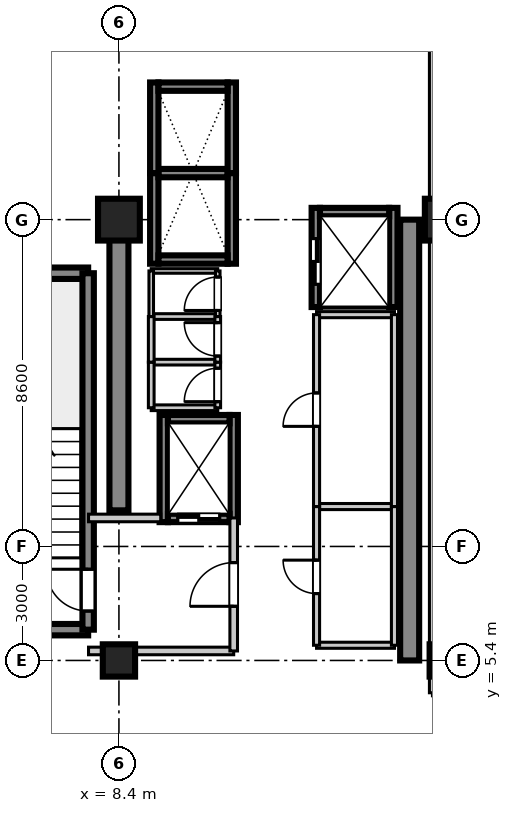
"""IFC4 building model, lengths in metres.
Left out: names, types, materials, properties, quantities, classifications, styles, units other than length and angle.
Written with IfcOpenShell. Run it as: python <this file> out.ifc"""

import sys

from ifc_helpers import new_model, si_unit, direction, frame, frame_2d, origin, origin_2d, place, context, subcontext, project, spatial, rectangle, extrude, source, transform, mapped, element, fill, save


model = new_model("IFC4")
c1 = context("Model", 3, precision=1e-05, world=origin(), true_north=direction((0.0, 1.0)))
c2 = subcontext(c1, "Body", "Model", "MODEL_VIEW")
j1 = project(units=[si_unit("LENGTHUNIT", "METRE"), si_unit("PLANEANGLEUNIT", "RADIAN")], contexts=[c1])
p1 = place(None, origin())
s1 = spatial("IfcSite", under=j1, at=p1, CompositionType="ELEMENT")
p2 = place(p1, origin())
s2 = spatial("IfcBuilding", under=s1, at=p2, CompositionType="ELEMENT")
p3 = place(p2, frame((0.0, 0.0, 156.3)))
s3 = spatial("IfcBuildingStorey", under=s2, at=p3, CompositionType="ELEMENT", Elevation=156.3)
m1 = source(origin(), c2, "Body", "SweptSolid", [
    extrude(rectangle(XDim=0.85, YDim=0.85, at=origin_2d()), origin(), (0.0, 0.0, 1.0), 3.605),
])
p4 = place(p3, frame((8.4, 5.4, 0.0), z_axis=(0.0, 0.0, 1.0), x_axis=(1.0, 0.0, 0.0)))
e1 = element("IfcColumn", 1, at=p4, inside=s3, PredefinedType="PILASTER", context=c2, shape_type="MappedRepresentation", body=[
    mapped(m1, transform((0.0, 0.0, 0.0), scale=1.0)),
])
m2 = source(origin(), c2, "Body", "SweptSolid", [
    extrude(rectangle(XDim=1.1, YDim=1.1, at=origin_2d()), origin(), (0.0, 0.0, 1.0), 3.605),
])
p5 = place(p3, frame((8.4, 17.0, 0.0), z_axis=(0.0, 0.0, 1.0), x_axis=(1.0, 0.0, 0.0)))
e2 = element("IfcColumn", 2, at=p5, inside=s3, PredefinedType="COLUMN", context=c2, shape_type="MappedRepresentation", body=[
    mapped(m2, transform((0.0, 0.0, 0.0), scale=1.0)),
])
p6 = place(p3, frame((17.0, 5.4, 0.0), z_axis=(0.0, 0.0, 1.0), x_axis=(1.0, 0.0, 0.0)))
e3 = element("IfcColumn", 3, at=p6, inside=s3, PredefinedType="PILASTER", context=c2, shape_type="MappedRepresentation", body=[
    mapped(m1, transform((0.0, 0.0, 0.0), scale=1.0)),
])
p7 = place(p3, frame((17.0, 17.0, 0.0), z_axis=(0.0, 0.0, 1.0), x_axis=(1.0, 0.0, 0.0)))
e4 = element("IfcColumn", 4, at=p7, inside=s3, PredefinedType="COLUMN", context=c2, shape_type="MappedRepresentation", body=[
    mapped(m2, transform((0.0, 0.0, 0.0), scale=1.0)),
])
m3 = source(origin(), c2, "Body", "SweptSolid", [
    extrude(rectangle(XDim=7.65, YDim=0.5, at=frame_2d((3.825, 0.0))), origin(), (0.0, 0.0, 1.0), 3.39),
])
p8 = place(p3, frame((8.4, 9.35, 0.0), z_axis=(0.0, 0.0, 1.0), x_axis=(0.0, 1.0, 0.0)))
e5 = element("IfcWall", 5, at=p8, inside=s3, PredefinedType="SHEAR", context=c2, shape_type="MappedRepresentation", body=[
    mapped(m3, transform((0.0, 0.0, 0.0), scale=1.0)),
])
m4 = source(origin(), c2, "Body", "SweptSolid", [
    extrude(rectangle(XDim=11.6, YDim=0.5, at=frame_2d((5.8, 0.0))), origin(), (0.0, 0.0, 1.0), 3.39),
])
p9 = place(p3, frame((16.05, 5.4, 0.0), z_axis=(0.0, 0.0, 1.0), x_axis=(0.0, 1.0, 0.0)))
e6 = element("IfcWall", 6, at=p9, inside=s3, PredefinedType="SHEAR", context=c2, shape_type="MappedRepresentation", body=[
    mapped(m4, transform((0.0, 0.0, 0.0), scale=1.0)),
])
m5 = source(origin(), c2, "Body", "SweptSolid", [
    extrude(rectangle(XDim=3.98, YDim=0.3, at=frame_2d((1.99, 0.0))), origin(), (0.0, 0.0, 1.0), 3.39),
])
for number, where, z_axis, x_axis in (
    (7, (3.61, 6.21, 0.0), (0.0, 0.0, 1.0), (1.0, 0.0, 0.0)),
    (8, (3.61, 15.59, 0.0), (0.0, 0.0, 1.0), (1.0, 0.0, 0.0)),
):
    element("IfcWall", number, at=place(p3, frame(where, z_axis=z_axis, x_axis=x_axis)), inside=s3, PredefinedType="SHEAR", context=c2, shape_type="MappedRepresentation", body=[
        mapped(m5, transform((0.0, 0.0, 0.0), scale=1.0)),
    ])
m6 = source(origin(), c2, "Body", "SweptSolid", [
    extrude(rectangle(XDim=9.38, YDim=0.3, at=frame_2d((4.69, 0.0))), origin(), (0.0, 0.0, 1.0), 3.39),
])
p10 = place(p3, frame((7.59, 6.21, 0.0), z_axis=(0.0, 0.0, 1.0), x_axis=(0.0, 1.0, 0.0)))
e9 = element("IfcWall", 9, at=p10, inside=s3, PredefinedType="SHEAR", context=c2, shape_type="MappedRepresentation", body=[
    mapped(m6, transform((0.0, 0.0, 0.0), scale=1.0)),
])
p11 = place(p10, frame((0.49, 0.0, 0.0)))
e10 = element("IfcOpeningElement", 10, at=p11, cuts=e9, PredefinedType="OPENING", context=c2, shape_type="SweptSolid", body=[
    extrude(rectangle(XDim=1.1, YDim=2.15, at=frame_2d((0.55, 1.075))), frame((0.0, 0.16, 0.0), z_axis=(0.0, -1.0, 0.0), x_axis=(1.0, 0.0, 0.0)), (0.0, 0.0, 1.0), 0.32),
])
m7 = source(origin(), c2, "Body", "SweptSolid", [
    extrude(rectangle(XDim=2.385, YDim=0.22, at=frame_2d((1.192, 0.0))), origin(), (0.0, 0.0, 1.0), 3.39),
])
for number, where, z_axis, x_axis in (
    (11, (9.33, 15.84, 0.0), (0.0, 0.0, 1.0), (0.0, 1.0, 0.0)),
    (12, (11.37, 15.84, 0.0), (0.0, 0.0, 1.0), (0.0, 1.0, 0.0)),
):
    element("IfcWall", number, at=place(p3, frame(where, z_axis=z_axis, x_axis=x_axis)), inside=s3, PredefinedType="SHEAR", context=c2, shape_type="MappedRepresentation", body=[
        mapped(m7, transform((0.0, 0.0, 0.0), scale=1.0)),
    ])
m8 = source(origin(), c2, "Body", "SweptSolid", [
    extrude(rectangle(XDim=1.82, YDim=0.22, at=frame_2d((0.91, 0.0))), origin(), (0.0, 0.0, 1.0), 3.39),
])
p12 = place(p3, frame((9.44, 15.95, 0.0), z_axis=(0.0, 0.0, 1.0), x_axis=(1.0, 0.0, 0.0)))
e13 = element("IfcWall", 13, at=p12, inside=s3, PredefinedType="SHEAR", context=c2, shape_type="MappedRepresentation", body=[
    mapped(m8, transform((0.0, 0.0, 0.0), scale=1.0)),
])
m9 = source(origin(), c2, "Body", "SweptSolid", [
    extrude(rectangle(XDim=1.82, YDim=0.22, at=frame_2d((0.91, 0.0))), origin(), (0.0, 0.0, 1.0), 3.65),
])
p13 = place(p3, frame((9.44, 18.225, 0.0), z_axis=(0.0, 0.0, 1.0), x_axis=(1.0, 0.0, 0.0)))
e14 = element("IfcWall", 14, at=p13, inside=s3, PredefinedType="SHEAR", context=c2, shape_type="MappedRepresentation", body=[
    mapped(m9, transform((0.0, 0.0, 0.0), scale=1.0)),
])
for number, where, z_axis, x_axis in (
    (15, (9.33, 18.225, 0.0), (0.0, 0.0, 1.0), (0.0, 1.0, 0.0)),
    (16, (11.37, 18.225, 0.0), (0.0, 0.0, 1.0), (0.0, 1.0, 0.0)),
):
    element("IfcWall", number, at=place(p3, frame(where, z_axis=z_axis, x_axis=x_axis)), inside=s3, PredefinedType="SHEAR", context=c2, shape_type="MappedRepresentation", body=[
        mapped(m7, transform((0.0, 0.0, 0.0), scale=1.0)),
    ])
p14 = place(p3, frame((9.44, 20.5, 0.0), z_axis=(0.0, 0.0, 1.0), x_axis=(1.0, 0.0, 0.0)))
e17 = element("IfcWall", 17, at=p14, inside=s3, PredefinedType="SHEAR", context=c2, shape_type="MappedRepresentation", body=[
    mapped(m8, transform((0.0, 0.0, 0.0), scale=1.0)),
])
m10 = source(origin(), c2, "Body", "SweptSolid", [
    extrude(rectangle(XDim=2.82, YDim=0.22, at=frame_2d((1.41, 0.0))), origin(), (0.0, 0.0, 1.0), 3.39),
])
for number, where, z_axis, x_axis in (
    (18, (9.58, 9.04, 0.0), (0.0, 0.0, 1.0), (0.0, 1.0, 0.0)),
    (19, (11.42, 9.04, 0.0), (0.0, 0.0, 1.0), (0.0, 1.0, 0.0)),
):
    element("IfcWall", number, at=place(p3, frame(where, z_axis=z_axis, x_axis=x_axis)), inside=s3, PredefinedType="SHEAR", context=c2, shape_type="MappedRepresentation", body=[
        mapped(m10, transform((0.0, 0.0, 0.0), scale=1.0)),
    ])
m11 = source(origin(), c2, "Body", "SweptSolid", [
    extrude(rectangle(XDim=1.62, YDim=0.22, at=frame_2d((0.81, 0.0))), origin(), (0.0, 0.0, 1.0), 3.39),
])
p15 = place(p3, frame((9.69, 9.15, 0.0), z_axis=(0.0, 0.0, 1.0), x_axis=(1.0, 0.0, 0.0)))
e20 = element("IfcWall", 20, at=p15, inside=s3, PredefinedType="SHEAR", context=c2, shape_type="MappedRepresentation", body=[
    mapped(m11, transform((0.0, 0.0, 0.0), scale=1.0)),
])
p16 = place(p15, frame((0.26, 0.0, 0.0)))
e21 = element("IfcOpeningElement", 21, at=p16, cuts=e20, PredefinedType="OPENING", context=c2, shape_type="SweptSolid", body=[
    extrude(rectangle(XDim=1.1, YDim=2.2, at=frame_2d((0.55, 1.1))), frame((0.0, 0.12, 0.0), z_axis=(0.0, -1.0, 0.0), x_axis=(1.0, 0.0, 0.0)), (0.0, 0.0, 1.0), 0.24),
])
p17 = place(p3, frame((9.69, 11.75, 0.0), z_axis=(0.0, 0.0, 1.0), x_axis=(1.0, 0.0, 0.0)))
e22 = element("IfcWall", 22, at=p17, inside=s3, PredefinedType="SHEAR", context=c2, shape_type="MappedRepresentation", body=[
    mapped(m11, transform((0.0, 0.0, 0.0), scale=1.0)),
])
m12 = source(origin(), c2, "Body", "SweptSolid", [
    extrude(rectangle(XDim=2.61, YDim=0.22, at=frame_2d((1.305, 0.0))), origin(), (0.0, 0.0, 1.0), 3.39),
])
p18 = place(p3, frame((13.58, 14.7, 0.0), z_axis=(0.0, 0.0, 1.0), x_axis=(0.0, 1.0, 0.0)))
e23 = element("IfcWall", 23, at=p18, inside=s3, PredefinedType="SHEAR", context=c2, shape_type="MappedRepresentation", body=[
    mapped(m12, transform((0.0, 0.0, 0.0), scale=1.0)),
])
p19 = place(p18, frame((0.6, 0.0, 0.0)))
e24 = element("IfcOpeningElement", 24, at=p19, cuts=e23, PredefinedType="OPENING", context=c2, shape_type="SweptSolid", body=[
    extrude(rectangle(XDim=1.2, YDim=2.2, at=frame_2d((0.6, 1.1))), frame((0.0, 0.12, 0.0), z_axis=(0.0, -1.0, 0.0), x_axis=(1.0, 0.0, 0.0)), (0.0, 0.0, 1.0), 0.24),
])
p20 = place(p3, frame((15.62, 14.7, 0.0), z_axis=(0.0, 0.0, 1.0), x_axis=(0.0, 1.0, 0.0)))
e25 = element("IfcWall", 25, at=p20, inside=s3, PredefinedType="SHEAR", context=c2, shape_type="MappedRepresentation", body=[
    mapped(m12, transform((0.0, 0.0, 0.0), scale=1.0)),
])
p21 = place(p3, frame((13.69, 17.2, 0.0), z_axis=(0.0, 0.0, 1.0), x_axis=(1.0, 0.0, 0.0)))
e26 = element("IfcWall", 26, at=p21, inside=s3, PredefinedType="SHEAR", context=c2, shape_type="MappedRepresentation", body=[
    mapped(m8, transform((0.0, 0.0, 0.0), scale=1.0)),
])
m13 = source(origin(), c2, "Body", "SweptSolid", [
    extrude(rectangle(XDim=3.82, YDim=0.2, at=frame_2d((1.91, 0.0))), origin(), (0.0, 0.0, 1.0), 2.73),
])
p22 = place(p3, frame((7.6, 5.65, 0.0), z_axis=(0.0, 0.0, 1.0), x_axis=(1.0, 0.0, 0.0)))
e27 = element("IfcWall", 27, at=p22, inside=s3, PredefinedType="PARTITIONING", context=c2, shape_type="MappedRepresentation", body=[
    mapped(m13, transform((0.0, 0.0, 0.0), scale=1.0)),
])
m14 = source(origin(), c2, "Body", "SweptSolid", [
    extrude(rectangle(XDim=1.9, YDim=0.2, at=frame_2d((0.95, 0.0))), origin(), (0.0, 0.0, 1.0), 2.73),
])
p23 = place(p3, frame((7.6, 9.15, 0.0), z_axis=(0.0, 0.0, 1.0), x_axis=(1.0, 0.0, 0.0)))
e28 = element("IfcWall", 28, at=p23, inside=s3, PredefinedType="PARTITIONING", context=c2, shape_type="MappedRepresentation", body=[
    mapped(m14, transform((0.0, 0.0, 0.0), scale=1.0)),
])
m15 = source(origin(), c2, "Body", "SweptSolid", [
    extrude(rectangle(XDim=3.5, YDim=0.2, at=frame_2d((1.75, 0.0))), origin(), (0.0, 0.0, 1.0), 2.73),
])
p24 = place(p3, frame((11.42, 5.65, 0.0), z_axis=(0.0, 0.0, 1.0), x_axis=(0.0, 1.0, 0.0)))
e29 = element("IfcWall", 29, at=p24, inside=s3, PredefinedType="PARTITIONING", context=c2, shape_type="MappedRepresentation", body=[
    mapped(m15, transform((0.0, 0.0, 0.0), scale=1.0)),
])
p25 = place(p24, frame((1.175, 0.0, 0.0)))
e30 = element("IfcOpeningElement", 30, at=p25, cuts=e29, PredefinedType="OPENING", context=c2, shape_type="SweptSolid", body=[
    extrude(rectangle(XDim=1.15, YDim=2.15, at=frame_2d((0.575, 1.075))), frame((0.0, 0.11, 0.0), z_axis=(0.0, -1.0, 0.0), x_axis=(1.0, 0.0, 0.0)), (0.0, 0.0, 1.0), 0.22),
])
m16 = source(origin(), c2, "Body", "SweptSolid", [
    extrude(rectangle(XDim=1.75, YDim=0.15, at=frame_2d((0.875, 0.0))), origin(), (0.0, 0.0, 1.0), 2.73),
])
for number, where, z_axis, x_axis in (
    (31, (9.25, 12.05, 0.0), (0.0, 0.0, 1.0), (1.0, 0.0, 0.0)),
    (32, (9.25, 13.25, 0.0), (0.0, 0.0, 1.0), (1.0, 0.0, 0.0)),
):
    element("IfcWall", number, at=place(p3, frame(where, z_axis=z_axis, x_axis=x_axis)), inside=s3, PredefinedType="PARTITIONING", context=c2, shape_type="MappedRepresentation", body=[
        mapped(m16, transform((0.0, 0.0, 0.0), scale=1.0)),
    ])
m17 = source(origin(), c2, "Body", "SweptSolid", [
    extrude(rectangle(XDim=1.2, YDim=0.15, at=frame_2d((0.6, 0.0))), origin(), (0.0, 0.0, 1.0), 2.73),
])
p26 = place(p3, frame((9.25, 12.05, 0.0), z_axis=(0.0, 0.0, 1.0), x_axis=(0.0, 1.0, 0.0)))
e33 = element("IfcWall", 33, at=p26, inside=s3, PredefinedType="PARTITIONING", context=c2, shape_type="MappedRepresentation", body=[
    mapped(m17, transform((0.0, 0.0, 0.0), scale=1.0)),
])
p27 = place(p3, frame((11.0, 12.05, 0.0), z_axis=(0.0, 0.0, 1.0), x_axis=(0.0, 1.0, 0.0)))
e34 = element("IfcWall", 34, at=p27, inside=s3, PredefinedType="PARTITIONING", context=c2, shape_type="MappedRepresentation", body=[
    mapped(m17, transform((0.0, 0.0, 0.0), scale=1.0)),
])
p28 = place(p27, frame((0.16, 0.0, 0.0)))
e35 = element("IfcOpeningElement", 35, at=p28, cuts=e34, PredefinedType="OPENING", context=c2, shape_type="SweptSolid", body=[
    extrude(rectangle(XDim=0.88, YDim=2.1, at=frame_2d((0.44, 1.05))), frame((0.0, 0.085, 0.0), z_axis=(0.0, -1.0, 0.0), x_axis=(1.0, 0.0, 0.0)), (0.0, 0.0, 1.0), 0.17),
])
p29 = place(p3, frame((9.25, 14.45, 0.0), z_axis=(0.0, 0.0, 1.0), x_axis=(1.0, 0.0, 0.0)))
e36 = element("IfcWall", 36, at=p29, inside=s3, PredefinedType="PARTITIONING", context=c2, shape_type="MappedRepresentation", body=[
    mapped(m16, transform((0.0, 0.0, 0.0), scale=1.0)),
])
p30 = place(p3, frame((9.25, 13.25, 0.0), z_axis=(0.0, 0.0, 1.0), x_axis=(0.0, 1.0, 0.0)))
e37 = element("IfcWall", 37, at=p30, inside=s3, PredefinedType="PARTITIONING", context=c2, shape_type="MappedRepresentation", body=[
    mapped(m17, transform((0.0, 0.0, 0.0), scale=1.0)),
])
p31 = place(p3, frame((11.0, 13.25, 0.0), z_axis=(0.0, 0.0, 1.0), x_axis=(0.0, 1.0, 0.0)))
e38 = element("IfcWall", 38, at=p31, inside=s3, PredefinedType="PARTITIONING", context=c2, shape_type="MappedRepresentation", body=[
    mapped(m17, transform((0.0, 0.0, 0.0), scale=1.0)),
])
p32 = place(p31, frame((0.16, 0.0, 0.0)))
e39 = element("IfcOpeningElement", 39, at=p32, cuts=e38, PredefinedType="OPENING", context=c2, shape_type="SweptSolid", body=[
    extrude(rectangle(XDim=0.88, YDim=2.1, at=frame_2d((0.44, 1.05))), frame((0.0, 0.085, 0.0), z_axis=(0.0, -1.0, 0.0), x_axis=(1.0, 0.0, 0.0)), (0.0, 0.0, 1.0), 0.17),
])
m18 = source(origin(), c2, "Body", "SweptSolid", [
    extrude(rectangle(XDim=1.75, YDim=0.12, at=frame_2d((0.875, 0.0))), origin(), (0.0, 0.0, 1.0), 2.73),
])
p33 = place(p3, frame((9.25, 15.65, 0.0), z_axis=(0.0, 0.0, 1.0), x_axis=(1.0, 0.0, 0.0)))
e40 = element("IfcWall", 40, at=p33, inside=s3, PredefinedType="PARTITIONING", context=c2, shape_type="MappedRepresentation", body=[
    mapped(m18, transform((0.0, 0.0, 0.0), scale=1.0)),
])
m19 = source(origin(), c2, "Body", "SweptSolid", [
    extrude(rectangle(XDim=1.2, YDim=0.12, at=frame_2d((0.6, 0.0))), origin(), (0.0, 0.0, 1.0), 2.73),
])
p34 = place(p3, frame((9.25, 14.45, 0.0), z_axis=(0.0, 0.0, 1.0), x_axis=(0.0, 1.0, 0.0)))
e41 = element("IfcWall", 41, at=p34, inside=s3, PredefinedType="PARTITIONING", context=c2, shape_type="MappedRepresentation", body=[
    mapped(m19, transform((0.0, 0.0, 0.0), scale=1.0)),
])
p35 = place(p3, frame((11.0, 14.45, 0.0), z_axis=(0.0, 0.0, 1.0), x_axis=(0.0, 1.0, 0.0)))
e42 = element("IfcWall", 42, at=p35, inside=s3, PredefinedType="PARTITIONING", context=c2, shape_type="MappedRepresentation", body=[
    mapped(m19, transform((0.0, 0.0, 0.0), scale=1.0)),
])
p36 = place(p35, frame((0.16, 0.0, 0.0)))
e43 = element("IfcOpeningElement", 43, at=p36, cuts=e42, PredefinedType="OPENING", context=c2, shape_type="SweptSolid", body=[
    extrude(rectangle(XDim=0.88, YDim=2.1, at=frame_2d((0.44, 1.05))), frame((0.0, 0.07, 0.0), z_axis=(0.0, -1.0, 0.0), x_axis=(1.0, 0.0, 0.0)), (0.0, 0.0, 1.0), 0.14),
])
m20 = source(origin(), c2, "Body", "SweptSolid", [
    extrude(rectangle(XDim=2.05, YDim=0.16, at=frame_2d((1.025, 0.0))), origin(), (0.0, 0.0, 1.0), 2.73),
])
for number, where, z_axis, x_axis in (
    (44, (13.6, 5.8, 0.0), (0.0, 0.0, 1.0), (1.0, 0.0, 0.0)),
    (45, (13.6, 9.45, 0.0), (0.0, 0.0, 1.0), (1.0, 0.0, 0.0)),
):
    element("IfcWall", number, at=place(p3, frame(where, z_axis=z_axis, x_axis=x_axis)), inside=s3, PredefinedType="PARTITIONING", context=c2, shape_type="MappedRepresentation", body=[
        mapped(m20, transform((0.0, 0.0, 0.0), scale=1.0)),
    ])
m21 = source(origin(), c2, "Body", "SweptSolid", [
    extrude(rectangle(XDim=3.65, YDim=0.16, at=frame_2d((1.825, 0.0))), origin(), (0.0, 0.0, 1.0), 2.73),
])
p37 = place(p3, frame((13.6, 5.8, 0.0), z_axis=(0.0, 0.0, 1.0), x_axis=(0.0, 1.0, 0.0)))
e46 = element("IfcWall", 46, at=p37, inside=s3, PredefinedType="PARTITIONING", context=c2, shape_type="MappedRepresentation", body=[
    mapped(m21, transform((0.0, 0.0, 0.0), scale=1.0)),
])
p38 = place(p37, frame((1.36, 0.0, 0.0)))
e47 = element("IfcOpeningElement", 47, at=p38, cuts=e46, PredefinedType="OPENING", context=c2, shape_type="SweptSolid", body=[
    extrude(rectangle(XDim=0.88, YDim=2.1, at=frame_2d((0.44, 1.05))), frame((0.0, 0.09, 0.0), z_axis=(0.0, -1.0, 0.0), x_axis=(1.0, 0.0, 0.0)), (0.0, 0.0, 1.0), 0.18),
])
p39 = place(p3, frame((15.65, 5.8, 0.0), z_axis=(0.0, 0.0, 1.0), x_axis=(0.0, 1.0, 0.0)))
e48 = element("IfcWall", 48, at=p39, inside=s3, PredefinedType="PARTITIONING", context=c2, shape_type="MappedRepresentation", body=[
    mapped(m21, transform((0.0, 0.0, 0.0), scale=1.0)),
])
p40 = place(p3, frame((13.6, 14.5, 0.0), z_axis=(0.0, 0.0, 1.0), x_axis=(1.0, 0.0, 0.0)))
e49 = element("IfcWall", 49, at=p40, inside=s3, PredefinedType="PARTITIONING", context=c2, shape_type="MappedRepresentation", body=[
    mapped(m20, transform((0.0, 0.0, 0.0), scale=1.0)),
])
m22 = source(origin(), c2, "Body", "SweptSolid", [
    extrude(rectangle(XDim=5.05, YDim=0.16, at=frame_2d((2.525, 0.0))), origin(), (0.0, 0.0, 1.0), 2.73),
])
p41 = place(p3, frame((13.6, 9.45, 0.0), z_axis=(0.0, 0.0, 1.0), x_axis=(0.0, 1.0, 0.0)))
e50 = element("IfcWall", 50, at=p41, inside=s3, PredefinedType="PARTITIONING", context=c2, shape_type="MappedRepresentation", body=[
    mapped(m22, transform((0.0, 0.0, 0.0), scale=1.0)),
])
p42 = place(p41, frame((2.11, 0.0, 0.0)))
e51 = element("IfcOpeningElement", 51, at=p42, cuts=e50, PredefinedType="OPENING", context=c2, shape_type="SweptSolid", body=[
    extrude(rectangle(XDim=0.88, YDim=2.1, at=frame_2d((0.44, 1.05))), frame((0.0, 0.09, 0.0), z_axis=(0.0, -1.0, 0.0), x_axis=(1.0, 0.0, 0.0)), (0.0, 0.0, 1.0), 0.18),
])
p43 = place(p3, frame((15.65, 9.45, 0.0), z_axis=(0.0, 0.0, 1.0), x_axis=(0.0, 1.0, 0.0)))
e52 = element("IfcWall", 52, at=p43, inside=s3, PredefinedType="PARTITIONING", context=c2, shape_type="MappedRepresentation", body=[
    mapped(m22, transform((0.0, 0.0, 0.0), scale=1.0)),
])
m23 = source(origin(), c2, "Body", "SweptSolid", [
    extrude(rectangle(XDim=17.95, YDim=0.16, at=frame_2d((8.975, 0.0))), origin(), (0.0, 0.0, 1.0), 2.73),
])
p44 = place(p3, frame((16.65, 4.55, 0.0), z_axis=(0.0, 0.0, 1.0), x_axis=(0.0, 1.0, 0.0)))
e53 = element("IfcWall", 53, at=p44, inside=s3, PredefinedType="PARTITIONING", context=c2, shape_type="MappedRepresentation", body=[
    mapped(m23, transform((0.0, 0.0, 0.0), scale=1.0)),
])
m24 = source(origin(), c2, "Body", "SweptSolid", [
    extrude(rectangle(XDim=1.1, YDim=2.15, at=frame_2d((0.55, 1.075))), frame((0.0, 0.025, 0.0), z_axis=(0.0, -1.0, 0.0), x_axis=(1.0, 0.0, 0.0)), (0.0, 0.0, 1.0), 0.05),
])
p45 = place(p11, origin())
e54 = element("IfcDoor", 54, at=p45, inside=s3, OperationType="SINGLE_SWING_RIGHT", PredefinedType="DOOR", context=c2, shape_type="MappedRepresentation", body=[
    mapped(m24, transform((0.0, 0.0, 0.0), scale=1.0)),
])
fill(e10, e54)
m25 = source(origin(), c2, "Body", "SweptSolid", [
    extrude(rectangle(XDim=1.1, YDim=2.2, at=frame_2d((0.55, 1.1))), frame((0.0, 0.025, 0.0), z_axis=(0.0, -1.0, 0.0), x_axis=(1.0, 0.0, 0.0)), (0.0, 0.0, 1.0), 0.05),
])
p46 = place(p16, frame((1.1, 0.0, 0.0), z_axis=(0.0, 0.0, 1.0), x_axis=(-1.0, 0.0, 0.0)))
e55 = element("IfcDoor", 55, at=p46, inside=s3, OperationType="DOUBLE_DOOR_SLIDING", PredefinedType="DOOR", context=c2, shape_type="MappedRepresentation", body=[
    mapped(m25, transform((0.0, 0.0, 0.0), scale=1.0)),
])
fill(e21, e55)
m26 = source(origin(), c2, "Body", "SweptSolid", [
    extrude(rectangle(XDim=1.2, YDim=2.2, at=frame_2d((0.6, 1.1))), frame((0.0, 0.025, 0.0), z_axis=(0.0, -1.0, 0.0), x_axis=(1.0, 0.0, 0.0)), (0.0, 0.0, 1.0), 0.05),
])
p47 = place(p19, origin())
e56 = element("IfcDoor", 56, at=p47, inside=s3, OperationType="DOUBLE_DOOR_SLIDING", PredefinedType="DOOR", context=c2, shape_type="MappedRepresentation", body=[
    mapped(m26, transform((0.0, 0.0, 0.0), scale=1.0)),
])
fill(e24, e56)
m27 = source(origin(), c2, "Body", "SweptSolid", [
    extrude(rectangle(XDim=1.15, YDim=2.15, at=frame_2d((0.575, 1.075))), frame((0.0, 0.025, 0.0), z_axis=(0.0, -1.0, 0.0), x_axis=(1.0, 0.0, 0.0)), (0.0, 0.0, 1.0), 0.05),
])
p48 = place(p25, frame((1.15, 0.0, 0.0), z_axis=(0.0, 0.0, 1.0), x_axis=(-1.0, 0.0, 0.0)))
e57 = element("IfcDoor", 57, at=p48, inside=s3, OperationType="SINGLE_SWING_LEFT", PredefinedType="DOOR", context=c2, shape_type="MappedRepresentation", body=[
    mapped(m27, transform((0.0, 0.0, 0.0), scale=1.0)),
])
fill(e30, e57)
m28 = source(origin(), c2, "Body", "SweptSolid", [
    extrude(rectangle(XDim=0.88, YDim=2.1, at=frame_2d((0.44, 1.05))), frame((0.0, 0.025, 0.0), z_axis=(0.0, -1.0, 0.0), x_axis=(1.0, 0.0, 0.0)), (0.0, 0.0, 1.0), 0.05),
])
p49 = place(p28, origin())
e58 = element("IfcDoor", 58, at=p49, inside=s3, OperationType="SINGLE_SWING_LEFT", PredefinedType="DOOR", context=c2, shape_type="MappedRepresentation", body=[
    mapped(m28, transform((0.0, 0.0, 0.0), scale=1.0)),
])
fill(e35, e58)
p50 = place(p32, origin())
e59 = element("IfcDoor", 59, at=p50, inside=s3, OperationType="SINGLE_SWING_RIGHT", PredefinedType="DOOR", context=c2, shape_type="MappedRepresentation", body=[
    mapped(m28, transform((0.0, 0.0, 0.0), scale=1.0)),
])
fill(e39, e59)
p51 = place(p36, origin())
e60 = element("IfcDoor", 60, at=p51, inside=s3, OperationType="SINGLE_SWING_LEFT", PredefinedType="DOOR", context=c2, shape_type="MappedRepresentation", body=[
    mapped(m28, transform((0.0, 0.0, 0.0), scale=1.0)),
])
fill(e43, e60)
p52 = place(p38, frame((0.88, 0.0, 0.0), z_axis=(0.0, 0.0, 1.0), x_axis=(-1.0, 0.0, 0.0)))
e61 = element("IfcDoor", 61, at=p52, inside=s3, OperationType="SINGLE_SWING_RIGHT", PredefinedType="DOOR", context=c2, shape_type="MappedRepresentation", body=[
    mapped(m28, transform((0.0, 0.0, 0.0), scale=1.0)),
])
fill(e47, e61)
p53 = place(p42, frame((0.88, 0.0, 0.0), z_axis=(0.0, 0.0, 1.0), x_axis=(-1.0, 0.0, 0.0)))
e62 = element("IfcDoor", 62, at=p53, inside=s3, OperationType="SINGLE_SWING_LEFT", PredefinedType="DOOR", context=c2, shape_type="MappedRepresentation", body=[
    mapped(m28, transform((0.0, 0.0, 0.0), scale=1.0)),
])
fill(e51, e62)
save(model, sys.argv[1])
